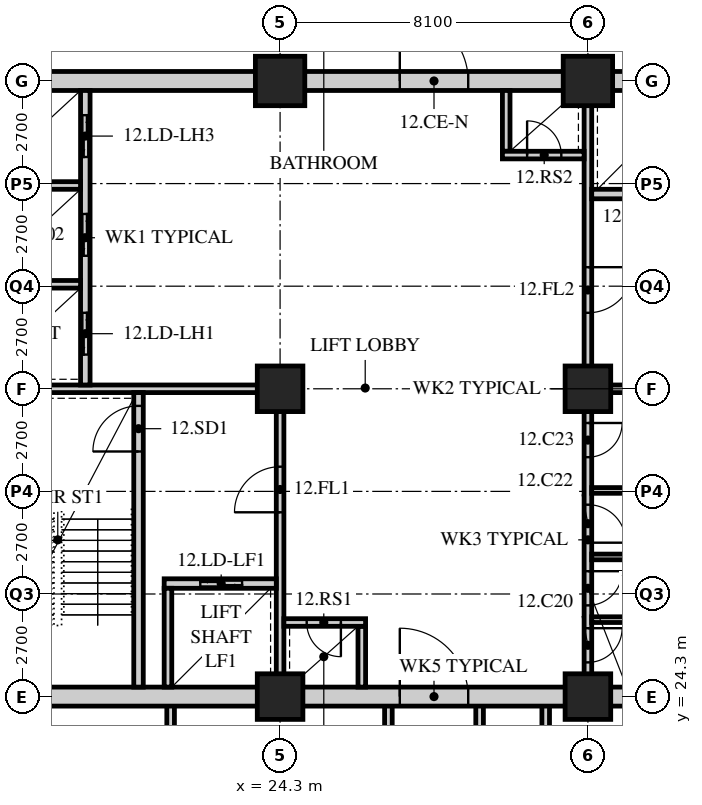
"""IFC4 building model, lengths in metres.
Left out: names, types, materials, properties, quantities, classifications, styles, units other than length and angle.
Written with IfcOpenShell. Run it as: python <this file> out.ifc"""

import sys

from ifc_helpers import new_model, si_unit, direction, frame, frame_2d, origin, origin_2d, place, context, subcontext, project, spatial, rectangle, hollow_rectangle, extrude, element, fill, save


model = new_model("IFC4")
c1 = context("Model", 3, precision=1e-05, world=origin(), true_north=direction((0.0, 1.0)))
c2 = subcontext(c1, "Body", "Model", "MODEL_VIEW")
j1 = project(units=[si_unit("LENGTHUNIT", "METRE"), si_unit("PLANEANGLEUNIT", "RADIAN")], contexts=[c1])
p1 = place(None, origin())
s1 = spatial("IfcSite", under=j1, at=p1, CompositionType="ELEMENT")
p2 = place(p1, origin())
s2 = spatial("IfcBuilding", under=s1, at=p2, CompositionType="ELEMENT")
p3 = place(p2, frame((0.0, 0.0, 53.4)))
s3 = spatial("IfcBuildingStorey", under=s2, at=p3, CompositionType="ELEMENT", Elevation=53.4)
for number, where, z_axis, x_axis in (
    (1, (24.3, 24.3, 0.0), (0.0, 0.0, 1.0), (1.0, 0.0, 0.0)),
    (2, (24.3, 32.4, 0.0), (0.0, 0.0, 1.0), (1.0, 0.0, 0.0)),
):
    element("IfcColumn", number, at=place(p3, frame(where, z_axis=z_axis, x_axis=x_axis)), inside=s3, PredefinedType="COLUMN", context=c2, shape_type="SweptSolid", body=[
        extrude(hollow_rectangle(XDim=1.2, YDim=1.2, WallThickness=0.12, at=origin_2d()), origin(), (0.0, 0.0, 1.0), 3.4),
    ])
p4 = place(p3, frame((24.3, 40.5, 0.0), z_axis=(0.0, 0.0, 1.0), x_axis=(1.0, 0.0, 0.0)))
e3 = element("IfcColumn", 3, at=p4, inside=s3, PredefinedType="COLUMN", context=c2, shape_type="SweptSolid", body=[
    extrude(hollow_rectangle(XDim=1.3, YDim=1.3, WallThickness=0.13, at=origin_2d()), origin(), (0.0, 0.0, 1.0), 3.4),
])
for number, where, z_axis, x_axis in (
    (4, (32.4, 24.3, 0.0), (0.0, 0.0, 1.0), (1.0, 0.0, 0.0)),
    (5, (32.4, 32.4, 0.0), (0.0, 0.0, 1.0), (1.0, 0.0, 0.0)),
):
    element("IfcColumn", number, at=place(p3, frame(where, z_axis=z_axis, x_axis=x_axis)), inside=s3, PredefinedType="COLUMN", context=c2, shape_type="SweptSolid", body=[
        extrude(hollow_rectangle(XDim=1.2, YDim=1.2, WallThickness=0.12, at=origin_2d()), origin(), (0.0, 0.0, 1.0), 3.4),
    ])
p5 = place(p3, frame((32.4, 40.5, 0.0), z_axis=(0.0, 0.0, 1.0), x_axis=(1.0, 0.0, 0.0)))
e6 = element("IfcColumn", 6, at=p5, inside=s3, PredefinedType="COLUMN", context=c2, shape_type="SweptSolid", body=[
    extrude(hollow_rectangle(XDim=1.3, YDim=1.3, WallThickness=0.13, at=origin_2d()), origin(), (0.0, 0.0, 1.0), 3.4),
])
for number, where, z_axis, x_axis in (
    (7, (21.42, 13.95, 0.0), (0.0, 0.0, 1.0), (0.0, 1.0, 0.0)),
    (8, (31.289, 13.95, 0.0), (0.0, 0.0, 1.0), (0.0, 1.0, 0.0)),
    (9, (27.15, 13.95, 0.0), (0.0, 0.0, 1.0), (0.0, 1.0, 0.0)),
    (10, (29.55, 13.95, 0.0), (0.0, 0.0, 1.0), (0.0, 1.0, 0.0)),
):
    element("IfcWall", number, at=place(p3, frame(where, z_axis=z_axis, x_axis=x_axis)), inside=s3, PredefinedType="SOLIDWALL", context=c2, shape_type="SweptSolid", body=[
        extrude(rectangle(XDim=10.35, YDim=0.2, at=frame_2d((5.175, 0.0))), origin(), (0.0, 0.0, 1.0), 3.19),
    ])
p6 = place(p3, frame((15.95, 24.3, 0.0), z_axis=(0.0, 0.0, 1.0), x_axis=(1.0, 0.0, 0.0)))
e11 = element("IfcWall", 11, at=p6, inside=s3, PredefinedType="SOLIDWALL", context=c2, shape_type="SweptSolid", body=[
    extrude(rectangle(XDim=24.8, YDim=0.5, at=frame_2d((12.4, 0.0))), origin(), (0.0, 0.0, 1.0), 2.54),
])
p7 = place(p6, frame((11.5, 0.0, 0.0)))
e12 = element("IfcOpeningElement", 12, at=p7, cuts=e11, PredefinedType="OPENING", context=c2, shape_type="SweptSolid", body=[
    extrude(rectangle(XDim=1.8, YDim=2.4, at=frame_2d((0.9, 1.2))), frame((0.0, 0.26, 0.0), z_axis=(0.0, -1.0, 0.0), x_axis=(1.0, 0.0, 0.0)), (0.0, 0.0, 1.0), 0.52),
])
p8 = place(p3, frame((15.95, 40.5, 0.0), z_axis=(0.0, 0.0, 1.0), x_axis=(1.0, 0.0, 0.0)))
e13 = element("IfcWall", 13, at=p8, inside=s3, PredefinedType="SOLIDWALL", context=c2, shape_type="SweptSolid", body=[
    extrude(rectangle(XDim=24.8, YDim=0.5, at=frame_2d((12.4, 0.0))), origin(), (0.0, 0.0, 1.0), 2.54),
])
p9 = place(p8, frame((11.5, 0.0, 0.0)))
e14 = element("IfcOpeningElement", 14, at=p9, cuts=e13, PredefinedType="OPENING", context=c2, shape_type="SweptSolid", body=[
    extrude(rectangle(XDim=1.8, YDim=2.4, at=frame_2d((0.9, 1.2))), frame((0.0, 0.26, 0.0), z_axis=(0.0, -1.0, 0.0), x_axis=(1.0, 0.0, 0.0)), (0.0, 0.0, 1.0), 0.52),
])
p10 = place(p3, frame((16.45, 32.4, 0.0), z_axis=(0.0, 0.0, 1.0), x_axis=(1.0, 0.0, 0.0)))
e15 = element("IfcWall", 15, at=p10, inside=s3, PredefinedType="SOLIDWALL", context=c2, shape_type="SweptSolid", body=[
    extrude(rectangle(XDim=7.95, YDim=0.2, at=frame_2d((3.975, 0.0))), origin(), (0.0, 0.0, 1.0), 2.578),
])
p11 = place(p3, frame((24.3, 24.55, 0.0), z_axis=(0.0, 0.0, 1.0), x_axis=(0.0, 1.0, 0.0)))
e16 = element("IfcWall", 16, at=p11, inside=s3, PredefinedType="SOLIDWALL", context=c2, shape_type="SweptSolid", body=[
    extrude(rectangle(XDim=7.75, YDim=0.2, at=frame_2d((3.875, 0.0))), origin(), (0.0, 0.0, 1.0), 2.578),
])
p12 = place(p11, frame((4.6, 0.0, 0.0)))
e17 = element("IfcOpeningElement", 17, at=p12, cuts=e16, PredefinedType="OPENING", context=c2, shape_type="SweptSolid", body=[
    extrude(rectangle(XDim=1.2, YDim=2.1, at=frame_2d((0.6, 1.05))), frame((0.0, 0.11, 0.0), z_axis=(0.0, -1.0, 0.0), x_axis=(1.0, 0.0, 0.0)), (0.0, 0.0, 1.0), 0.22),
])
p13 = place(p3, frame((20.575, 24.55, 0.0), z_axis=(0.0, 0.0, 1.0), x_axis=(0.0, 1.0, 0.0)))
e18 = element("IfcWall", 18, at=p13, inside=s3, PredefinedType="SOLIDWALL", context=c2, shape_type="SweptSolid", body=[
    extrude(rectangle(XDim=7.75, YDim=0.25, at=frame_2d((3.875, 0.0))), origin(), (0.0, 0.0, 1.0), 3.19),
])
p14 = place(p13, frame((6.2, 0.0, 0.0)))
e19 = element("IfcOpeningElement", 19, at=p14, cuts=e18, PredefinedType="OPENING", context=c2, shape_type="SweptSolid", body=[
    extrude(rectangle(XDim=1.2, YDim=2.1, at=frame_2d((0.6, 1.05))), frame((0.0, 0.135, 0.0), z_axis=(0.0, -1.0, 0.0), x_axis=(1.0, 0.0, 0.0)), (0.0, 0.0, 1.0), 0.27),
])
p15 = place(p3, frame((21.25, 27.275, 0.0), z_axis=(0.0, 0.0, 1.0), x_axis=(1.0, 0.0, 0.0)))
e20 = element("IfcWall", 20, at=p15, inside=s3, PredefinedType="SOLIDWALL", context=c2, shape_type="SweptSolid", body=[
    extrude(rectangle(XDim=2.95, YDim=0.25, at=frame_2d((1.475, 0.0))), origin(), (0.0, 0.0, 1.0), 3.19),
])
p16 = place(p15, frame((0.95, 0.0, 0.0)))
e21 = element("IfcOpeningElement", 21, at=p16, cuts=e20, PredefinedType="OPENING", context=c2, shape_type="SweptSolid", body=[
    extrude(rectangle(XDim=1.1, YDim=2.4, at=frame_2d((0.55, 1.2))), frame((0.0, 0.135, 0.0), z_axis=(0.0, -1.0, 0.0), x_axis=(1.0, 0.0, 0.0)), (0.0, 0.0, 1.0), 0.27),
])
p17 = place(p3, frame((21.35, 24.55, 0.0), z_axis=(0.0, 0.0, 1.0), x_axis=(0.0, 1.0, 0.0)))
e22 = element("IfcWall", 22, at=p17, inside=s3, PredefinedType="SOLIDWALL", context=c2, shape_type="SweptSolid", body=[
    extrude(rectangle(XDim=2.6, YDim=0.2, at=frame_2d((1.3, 0.0))), origin(), (0.0, 0.0, 1.0), 3.19),
])
p18 = place(p3, frame((19.175, 32.5, 0.0), z_axis=(0.0, 0.0, 1.0), x_axis=(0.0, 1.0, 0.0)))
e23 = element("IfcWall", 23, at=p18, inside=s3, PredefinedType="SOLIDWALL", context=c2, shape_type="SweptSolid", body=[
    extrude(rectangle(XDim=7.75, YDim=0.25, at=frame_2d((3.875, 0.0))), origin(), (0.0, 0.0, 1.0), 3.19),
])
p19 = place(p18, frame((0.8, 0.0, 0.0)))
e24 = element("IfcOpeningElement", 24, at=p19, cuts=e23, PredefinedType="OPENING", context=c2, shape_type="SweptSolid", body=[
    extrude(rectangle(XDim=1.1, YDim=2.4, at=frame_2d((0.55, 1.2))), frame((0.0, 0.135, 0.0), z_axis=(0.0, -1.0, 0.0), x_axis=(1.0, 0.0, 0.0)), (0.0, 0.0, 1.0), 0.27),
])
p20 = place(p18, frame((3.4, 0.0, 0.0)))
e25 = element("IfcOpeningElement", 25, at=p20, cuts=e23, PredefinedType="OPENING", context=c2, shape_type="SweptSolid", body=[
    extrude(rectangle(XDim=1.1, YDim=2.4, at=frame_2d((0.55, 1.2))), frame((0.0, 0.135, 0.0), z_axis=(0.0, -1.0, 0.0), x_axis=(1.0, 0.0, 0.0)), (0.0, 0.0, 1.0), 0.27),
])
p21 = place(p18, frame((6.0, 0.0, 0.0)))
e26 = element("IfcOpeningElement", 26, at=p21, cuts=e23, PredefinedType="OPENING", context=c2, shape_type="SweptSolid", body=[
    extrude(rectangle(XDim=1.1, YDim=2.4, at=frame_2d((0.55, 1.2))), frame((0.0, 0.135, 0.0), z_axis=(0.0, -1.0, 0.0), x_axis=(1.0, 0.0, 0.0)), (0.0, 0.0, 1.0), 0.27),
])
for number, where, z_axis, x_axis in (
    (27, (16.45, 35.15, 0.0), (0.0, 0.0, 1.0), (1.0, 0.0, 0.0)),
    (28, (16.45, 37.75, 0.0), (0.0, 0.0, 1.0), (1.0, 0.0, 0.0)),
):
    element("IfcWall", number, at=place(p3, frame(where, z_axis=z_axis, x_axis=x_axis)), inside=s3, PredefinedType="SOLIDWALL", context=c2, shape_type="SweptSolid", body=[
        extrude(rectangle(XDim=2.6, YDim=0.2, at=frame_2d((1.3, 0.0))), origin(), (0.0, 0.0, 1.0), 3.19),
    ])
p22 = place(p3, frame((26.45, 24.55, 0.0), z_axis=(0.0, 0.0, 1.0), x_axis=(0.0, 1.0, 0.0)))
e29 = element("IfcWall", 29, at=p22, inside=s3, PredefinedType="SOLIDWALL", context=c2, shape_type="SweptSolid", body=[
    extrude(rectangle(XDim=1.6, YDim=0.2, at=frame_2d((0.8, 0.0))), origin(), (0.0, 0.0, 1.0), 3.19),
])
p23 = place(p3, frame((24.4, 26.25, 0.0), z_axis=(0.0, 0.0, 1.0), x_axis=(1.0, 0.0, 0.0)))
e30 = element("IfcWall", 30, at=p23, inside=s3, PredefinedType="SOLIDWALL", context=c2, shape_type="SweptSolid", body=[
    extrude(rectangle(XDim=2.15, YDim=0.2, at=frame_2d((1.075, 0.0))), origin(), (0.0, 0.0, 1.0), 3.19),
])
p24 = place(p23, frame((0.6, 0.0, 0.0)))
e31 = element("IfcOpeningElement", 31, at=p24, cuts=e30, PredefinedType="OPENING", context=c2, shape_type="SweptSolid", body=[
    extrude(rectangle(XDim=0.9, YDim=2.1, at=frame_2d((0.45, 1.05))), frame((0.0, 0.11, 0.0), z_axis=(0.0, -1.0, 0.0), x_axis=(1.0, 0.0, 0.0)), (0.0, 0.0, 1.0), 0.22),
])
p25 = place(p3, frame((32.3, 32.4, 0.0), z_axis=(0.0, 0.0, 1.0), x_axis=(1.0, 0.0, 0.0)))
e32 = element("IfcWall", 32, at=p25, inside=s3, PredefinedType="SOLIDWALL", context=c2, shape_type="SweptSolid", body=[
    extrude(rectangle(XDim=7.95, YDim=0.2, at=frame_2d((3.975, 0.0))), origin(), (0.0, 0.0, 1.0), 2.578),
])
p26 = place(p3, frame((32.4, 32.5, 0.0), z_axis=(0.0, 0.0, 1.0), x_axis=(0.0, 1.0, 0.0)))
e33 = element("IfcWall", 33, at=p26, inside=s3, PredefinedType="SOLIDWALL", context=c2, shape_type="SweptSolid", body=[
    extrude(rectangle(XDim=7.75, YDim=0.2, at=frame_2d((3.875, 0.0))), origin(), (0.0, 0.0, 1.0), 2.578),
])
p27 = place(p26, frame((1.9, 0.0, 0.0)))
e34 = element("IfcOpeningElement", 34, at=p27, cuts=e33, PredefinedType="OPENING", context=c2, shape_type="SweptSolid", body=[
    extrude(rectangle(XDim=1.2, YDim=2.1, at=frame_2d((0.6, 1.05))), frame((0.0, 0.11, 0.0), z_axis=(0.0, -1.0, 0.0), x_axis=(1.0, 0.0, 0.0)), (0.0, 0.0, 1.0), 0.22),
])
p28 = place(p3, frame((32.5, 37.525, 0.0), z_axis=(0.0, 0.0, 1.0), x_axis=(1.0, 0.0, 0.0)))
e35 = element("IfcWall", 35, at=p28, inside=s3, PredefinedType="SOLIDWALL", context=c2, shape_type="SweptSolid", body=[
    extrude(rectangle(XDim=2.95, YDim=0.25, at=frame_2d((1.475, 0.0))), origin(), (0.0, 0.0, 1.0), 3.19),
])
p29 = place(p28, frame((0.9, 0.0, 0.0)))
e36 = element("IfcOpeningElement", 36, at=p29, cuts=e35, PredefinedType="OPENING", context=c2, shape_type="SweptSolid", body=[
    extrude(rectangle(XDim=1.1, YDim=2.4, at=frame_2d((0.55, 1.2))), frame((0.0, 0.135, 0.0), z_axis=(0.0, -1.0, 0.0), x_axis=(1.0, 0.0, 0.0)), (0.0, 0.0, 1.0), 0.27),
])
p30 = place(p3, frame((30.25, 38.65, 0.0), z_axis=(0.0, 0.0, 1.0), x_axis=(0.0, 1.0, 0.0)))
e37 = element("IfcWall", 37, at=p30, inside=s3, PredefinedType="SOLIDWALL", context=c2, shape_type="SweptSolid", body=[
    extrude(rectangle(XDim=1.6, YDim=0.2, at=frame_2d((0.8, 0.0))), origin(), (0.0, 0.0, 1.0), 3.19),
])
p31 = place(p3, frame((30.15, 38.55, 0.0), z_axis=(0.0, 0.0, 1.0), x_axis=(1.0, 0.0, 0.0)))
e38 = element("IfcWall", 38, at=p31, inside=s3, PredefinedType="SOLIDWALL", context=c2, shape_type="SweptSolid", body=[
    extrude(rectangle(XDim=2.15, YDim=0.2, at=frame_2d((1.075, 0.0))), origin(), (0.0, 0.0, 1.0), 3.19),
])
p32 = place(p31, frame((0.65, 0.0, 0.0)))
e39 = element("IfcOpeningElement", 39, at=p32, cuts=e38, PredefinedType="OPENING", context=c2, shape_type="SweptSolid", body=[
    extrude(rectangle(XDim=0.9, YDim=2.1, at=frame_2d((0.45, 1.05))), frame((0.0, 0.11, 0.0), z_axis=(0.0, -1.0, 0.0), x_axis=(1.0, 0.0, 0.0)), (0.0, 0.0, 1.0), 0.22),
])
p33 = place(p3, frame((32.4, 24.55, 0.0), z_axis=(0.0, 0.0, 1.0), x_axis=(0.0, 1.0, 0.0)))
e40 = element("IfcWall", 40, at=p33, inside=s3, PredefinedType="PARTITIONING", context=c2, shape_type="SweptSolid", body=[
    extrude(rectangle(XDim=7.75, YDim=0.2, at=frame_2d((3.875, 0.0))), origin(), (0.0, 0.0, 1.0), 2.578),
])
p34 = place(p33, frame((0.65, 0.0, 0.0)))
e41 = element("IfcOpeningElement", 41, at=p34, cuts=e40, PredefinedType="OPENING", context=c2, shape_type="SweptSolid", body=[
    extrude(rectangle(XDim=0.9, YDim=2.1, at=frame_2d((0.45, 1.05))), frame((0.0, 0.11, 0.0), z_axis=(0.0, -1.0, 0.0), x_axis=(1.0, 0.0, 0.0)), (0.0, 0.0, 1.0), 0.22),
])
p35 = place(p33, frame((2.15, 0.0, 0.0)))
e42 = element("IfcOpeningElement", 42, at=p35, cuts=e40, PredefinedType="OPENING", context=c2, shape_type="SweptSolid", body=[
    extrude(rectangle(XDim=0.9, YDim=2.1, at=frame_2d((0.45, 1.05))), frame((0.0, 0.11, 0.0), z_axis=(0.0, -1.0, 0.0), x_axis=(1.0, 0.0, 0.0)), (0.0, 0.0, 1.0), 0.22),
])
p36 = place(p33, frame((3.8, 0.0, 0.0)))
e43 = element("IfcOpeningElement", 43, at=p36, cuts=e40, PredefinedType="OPENING", context=c2, shape_type="SweptSolid", body=[
    extrude(rectangle(XDim=1.0, YDim=2.1, at=frame_2d((0.5, 1.05))), frame((0.0, 0.11, 0.0), z_axis=(0.0, -1.0, 0.0), x_axis=(1.0, 0.0, 0.0)), (0.0, 0.0, 1.0), 0.22),
])
p37 = place(p33, frame((6.05, 0.0, 0.0)))
e44 = element("IfcOpeningElement", 44, at=p37, cuts=e40, PredefinedType="OPENING", context=c2, shape_type="SweptSolid", body=[
    extrude(rectangle(XDim=0.9, YDim=2.1, at=frame_2d((0.45, 1.05))), frame((0.0, 0.11, 0.0), z_axis=(0.0, -1.0, 0.0), x_axis=(1.0, 0.0, 0.0)), (0.0, 0.0, 1.0), 0.22),
])
for number, where, z_axis, x_axis in (
    (45, (32.5, 26.325, 0.0), (0.0, 0.0, 1.0), (1.0, 0.0, 0.0)),
    (46, (32.5, 27.975, 0.0), (0.0, 0.0, 1.0), (1.0, 0.0, 0.0)),
):
    element("IfcWall", number, at=place(p3, frame(where, z_axis=z_axis, x_axis=x_axis)), inside=s3, PredefinedType="PARTITIONING", context=c2, shape_type="SweptSolid", body=[
        extrude(rectangle(XDim=2.55, YDim=0.15, at=frame_2d((1.275, 0.0))), origin(), (0.0, 0.0, 1.0), 3.19),
    ])
p38 = place(p3, frame((32.5, 29.725, 0.0), z_axis=(0.0, 0.0, 1.0), x_axis=(1.0, 0.0, 0.0)))
e47 = element("IfcWall", 47, at=p38, inside=s3, PredefinedType="PARTITIONING", context=c2, shape_type="SweptSolid", body=[
    extrude(rectangle(XDim=2.4, YDim=0.15, at=frame_2d((1.2, 0.0))), origin(), (0.0, 0.0, 1.0), 3.19),
])
p39 = place(p34, origin())
e48 = element("IfcDoor", 48, at=p39, inside=s3, OperationType="SINGLE_SWING_LEFT", PredefinedType="DOOR", context=c2, shape_type="SweptSolid", body=[
    extrude(rectangle(XDim=0.9, YDim=2.1, at=frame_2d((0.45, 1.05))), frame((0.0, 0.025, 0.0), z_axis=(0.0, -1.0, 0.0), x_axis=(1.0, 0.0, 0.0)), (0.0, 0.0, 1.0), 0.05),
])
fill(e41, e48)
p40 = place(p35, origin())
e49 = element("IfcDoor", 49, at=p40, inside=s3, OperationType="SINGLE_SWING_LEFT", PredefinedType="DOOR", context=c2, shape_type="SweptSolid", body=[
    extrude(rectangle(XDim=0.9, YDim=2.1, at=frame_2d((0.45, 1.05))), frame((0.0, 0.025, 0.0), z_axis=(0.0, -1.0, 0.0), x_axis=(1.0, 0.0, 0.0)), (0.0, 0.0, 1.0), 0.05),
])
fill(e42, e49)
p41 = place(p36, origin())
e50 = element("IfcDoor", 50, at=p41, inside=s3, OperationType="SINGLE_SWING_RIGHT", PredefinedType="DOOR", context=c2, shape_type="SweptSolid", body=[
    extrude(rectangle(XDim=1.0, YDim=2.1, at=frame_2d((0.5, 1.05))), frame((0.0, 0.025, 0.0), z_axis=(0.0, -1.0, 0.0), x_axis=(1.0, 0.0, 0.0)), (0.0, 0.0, 1.0), 0.05),
])
fill(e43, e50)
p42 = place(p37, origin())
e51 = element("IfcDoor", 51, at=p42, inside=s3, OperationType="SINGLE_SWING_LEFT", PredefinedType="DOOR", context=c2, shape_type="SweptSolid", body=[
    extrude(rectangle(XDim=0.9, YDim=2.1, at=frame_2d((0.45, 1.05))), frame((0.0, 0.025, 0.0), z_axis=(0.0, -1.0, 0.0), x_axis=(1.0, 0.0, 0.0)), (0.0, 0.0, 1.0), 0.05),
])
fill(e44, e51)
p43 = place(p14, origin())
e52 = element("IfcDoor", 52, at=p43, inside=s3, OperationType="SINGLE_SWING_LEFT", PredefinedType="DOOR", context=c2, shape_type="SweptSolid", body=[
    extrude(rectangle(XDim=1.2, YDim=2.1, at=frame_2d((0.6, 1.05))), frame((0.0, 0.025, 0.0), z_axis=(0.0, -1.0, 0.0), x_axis=(1.0, 0.0, 0.0)), (0.0, 0.0, 1.0), 0.05),
])
fill(e19, e52)
p44 = place(p12, origin())
e53 = element("IfcDoor", 53, at=p44, inside=s3, OperationType="SINGLE_SWING_LEFT", PredefinedType="DOOR", context=c2, shape_type="SweptSolid", body=[
    extrude(rectangle(XDim=1.2, YDim=2.1, at=frame_2d((0.6, 1.05))), frame((0.0, 0.025, 0.0), z_axis=(0.0, -1.0, 0.0), x_axis=(1.0, 0.0, 0.0)), (0.0, 0.0, 1.0), 0.05),
])
fill(e17, e53)
p45 = place(p24, origin())
e54 = element("IfcDoor", 54, at=p45, inside=s3, OperationType="SINGLE_SWING_LEFT", PredefinedType="DOOR", context=c2, shape_type="SweptSolid", body=[
    extrude(rectangle(XDim=0.9, YDim=2.1, at=frame_2d((0.45, 1.05))), frame((0.0, 0.025, 0.0), z_axis=(0.0, -1.0, 0.0), x_axis=(1.0, 0.0, 0.0)), (0.0, 0.0, 1.0), 0.05),
])
fill(e31, e54)
p46 = place(p27, origin())
e55 = element("IfcDoor", 55, at=p46, inside=s3, OperationType="SINGLE_SWING_LEFT", PredefinedType="DOOR", context=c2, shape_type="SweptSolid", body=[
    extrude(rectangle(XDim=1.2, YDim=2.1, at=frame_2d((0.6, 1.05))), frame((0.0, 0.025, 0.0), z_axis=(0.0, -1.0, 0.0), x_axis=(1.0, 0.0, 0.0)), (0.0, 0.0, 1.0), 0.05),
])
fill(e34, e55)
p47 = place(p32, origin())
e56 = element("IfcDoor", 56, at=p47, inside=s3, OperationType="SINGLE_SWING_LEFT", PredefinedType="DOOR", context=c2, shape_type="SweptSolid", body=[
    extrude(rectangle(XDim=0.9, YDim=2.1, at=frame_2d((0.45, 1.05))), frame((0.0, 0.025, 0.0), z_axis=(0.0, -1.0, 0.0), x_axis=(1.0, 0.0, 0.0)), (0.0, 0.0, 1.0), 0.05),
])
fill(e39, e56)
p48 = place(p19, origin())
e57 = element("IfcDoor", 57, at=p48, inside=s3, OperationType="DOUBLE_DOOR_SLIDING", PredefinedType="DOOR", context=c2, shape_type="SweptSolid", body=[
    extrude(rectangle(XDim=1.1, YDim=2.4, at=frame_2d((0.55, 1.2))), frame((0.0, 0.025, 0.0), z_axis=(0.0, -1.0, 0.0), x_axis=(1.0, 0.0, 0.0)), (0.0, 0.0, 1.0), 0.05),
])
fill(e24, e57)
p49 = place(p20, origin())
e58 = element("IfcDoor", 58, at=p49, inside=s3, OperationType="DOUBLE_DOOR_SLIDING", PredefinedType="DOOR", context=c2, shape_type="SweptSolid", body=[
    extrude(rectangle(XDim=1.1, YDim=2.4, at=frame_2d((0.55, 1.2))), frame((0.0, 0.025, 0.0), z_axis=(0.0, -1.0, 0.0), x_axis=(1.0, 0.0, 0.0)), (0.0, 0.0, 1.0), 0.05),
])
fill(e25, e58)
p50 = place(p21, origin())
e59 = element("IfcDoor", 59, at=p50, inside=s3, OperationType="DOUBLE_DOOR_SLIDING", PredefinedType="DOOR", context=c2, shape_type="SweptSolid", body=[
    extrude(rectangle(XDim=1.1, YDim=2.4, at=frame_2d((0.55, 1.2))), frame((0.0, 0.025, 0.0), z_axis=(0.0, -1.0, 0.0), x_axis=(1.0, 0.0, 0.0)), (0.0, 0.0, 1.0), 0.05),
])
fill(e26, e59)
p51 = place(p16, origin())
e60 = element("IfcDoor", 60, at=p51, inside=s3, OperationType="DOUBLE_DOOR_SLIDING", PredefinedType="DOOR", context=c2, shape_type="SweptSolid", body=[
    extrude(rectangle(XDim=1.1, YDim=2.4, at=frame_2d((0.55, 1.2))), frame((0.0, 0.025, 0.0), z_axis=(0.0, -1.0, 0.0), x_axis=(1.0, 0.0, 0.0)), (0.0, 0.0, 1.0), 0.05),
])
fill(e21, e60)
p52 = place(p7, origin())
e61 = element("IfcDoor", 61, at=p52, inside=s3, OperationType="DOUBLE_DOOR_SINGLE_SWING", PredefinedType="DOOR", context=c2, shape_type="SweptSolid", body=[
    extrude(rectangle(XDim=1.8, YDim=2.4, at=frame_2d((0.9, 1.2))), frame((0.0, 0.025, 0.0), z_axis=(0.0, -1.0, 0.0), x_axis=(1.0, 0.0, 0.0)), (0.0, 0.0, 1.0), 0.05),
])
fill(e12, e61)
p53 = place(p9, origin())
e62 = element("IfcDoor", 62, at=p53, inside=s3, OperationType="DOUBLE_DOOR_SINGLE_SWING", PredefinedType="DOOR", context=c2, shape_type="SweptSolid", body=[
    extrude(rectangle(XDim=1.8, YDim=2.4, at=frame_2d((0.9, 1.2))), frame((0.0, 0.025, 0.0), z_axis=(0.0, -1.0, 0.0), x_axis=(1.0, 0.0, 0.0)), (0.0, 0.0, 1.0), 0.05),
])
fill(e14, e62)
save(model, sys.argv[1])
